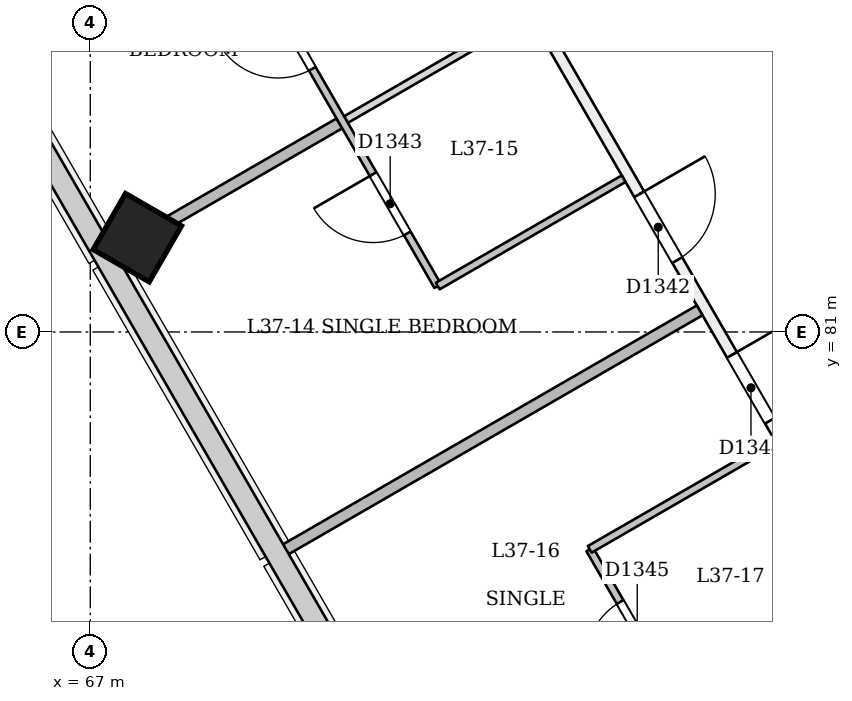
"""IFC4 building model, lengths in metres.
Left out: names, types, materials, properties, quantities, classifications, styles, units other than length and angle.
Written with IfcOpenShell. Run it as: python <this file> out.ifc"""

import sys

from ifc_helpers import new_model, si_unit, direction, frame, frame_2d, origin, origin_2d, place, context, subcontext, project, spatial, rectangle, extrude, element, fill, save


model = new_model("IFC4")
c1 = context("Model", 3, precision=1e-05, world=origin(), true_north=direction((0.0, 1.0)))
c2 = subcontext(c1, "Body", "Model", "MODEL_VIEW")
j1 = project(units=[si_unit("LENGTHUNIT", "METRE"), si_unit("PLANEANGLEUNIT", "RADIAN")], contexts=[c1])
p1 = place(None, origin())
s1 = spatial("IfcSite", under=j1, at=p1, CompositionType="ELEMENT")
p2 = place(p1, origin())
s2 = spatial("IfcBuilding", under=s1, at=p2, CompositionType="ELEMENT")
p3 = place(p2, frame((0.0, 0.0, 145.8)))
s3 = spatial("IfcBuildingStorey", under=s2, at=p3, CompositionType="ELEMENT", Elevation=145.8)
p4 = place(p3, frame((67.592, 82.193, -0.026), z_axis=(0.02222134892, 0.038480872521, 0.999012229206), x_axis=(-0.86564209005, -0.49918218391, 0.038482713007)))
e1 = element("IfcColumn", 1, at=p4, inside=s3, PredefinedType="COLUMN", context=c2, shape_type="SweptSolid", body=[
    extrude(rectangle(XDim=0.85, YDim=0.85, at=origin_2d()), origin(), (0.0, 0.0, 1.0), 3.604),
])
p5 = place(p3, frame((84.935, 70.457, 0.0), z_axis=(0.0, 0.0, 1.0), x_axis=(-0.50000209693, 0.866024193118, 0.0)))
e2 = element("IfcWall", 2, at=p5, inside=s3, PredefinedType="PARTITIONING", context=c2, shape_type="SweptSolid", body=[
    extrude(rectangle(XDim=22.798, YDim=0.15, at=frame_2d((11.399, 0.0))), origin(), (0.0, 0.0, 1.0), 3.15),
])
p6 = place(p5, frame((19.283, 0.0, 0.0)))
e3 = element("IfcOpeningElement", 3, at=p6, cuts=e2, PredefinedType="OPENING", context=c2, shape_type="SweptSolid", body=[
    extrude(rectangle(XDim=1.0, YDim=2.1, at=frame_2d((0.5, 1.05))), frame((0.0, 0.085, 0.0), z_axis=(0.0, -1.0, 0.0), x_axis=(1.0, 0.0, 0.0)), (0.0, 0.0, 1.0), 0.171),
])
p7 = place(p5, frame((13.973, 0.0, 0.0)))
e4 = element("IfcOpeningElement", 4, at=p7, cuts=e2, PredefinedType="OPENING", context=c2, shape_type="SweptSolid", body=[
    extrude(rectangle(XDim=1.0, YDim=2.1, at=frame_2d((0.5, 1.05))), frame((0.0, 0.085, 0.0), z_axis=(0.0, -1.0, 0.0), x_axis=(1.0, 0.0, 0.0)), (0.0, 0.0, 1.0), 0.171),
])
p8 = place(p5, frame((5.691, 0.0, 0.0)))
e5 = element("IfcOpeningElement", 5, at=p8, cuts=e2, PredefinedType="OPENING", context=c2, shape_type="SweptSolid", body=[
    extrude(rectangle(XDim=1.0, YDim=2.1, at=frame_2d((0.5, 1.05))), frame((0.0, 0.085, 0.0), z_axis=(0.0, -1.0, 0.0), x_axis=(1.0, 0.0, 0.0)), (0.0, 0.0, 1.0), 0.171),
])
p9 = place(p5, frame((9.424, 0.0, 0.0)))
e6 = element("IfcOpeningElement", 6, at=p9, cuts=e2, PredefinedType="OPENING", context=c2, shape_type="SweptSolid", body=[
    extrude(rectangle(XDim=1.0, YDim=2.1, at=frame_2d((0.5, 1.05))), frame((0.0, 0.085, 0.0), z_axis=(0.0, -1.0, 0.0), x_axis=(1.0, 0.0, 0.0)), (0.0, 0.0, 1.0), 0.171),
])
p10 = place(p3, frame((66.082, 96.91, 0.0), z_axis=(0.0, 0.0, 1.0), x_axis=(0.500001949747, -0.866024278094, 0.0)))
e7 = element("IfcWall", 7, at=p10, inside=s3, PredefinedType="PARTITIONING", context=c2, shape_type="SweptSolid", body=[
    extrude(rectangle(XDim=37.705, YDim=0.15, at=frame_2d((18.853, 0.0))), origin(), (0.0, 0.0, 1.0), 2.75),
])
p11 = place(p10, frame((1.75, 0.0, 0.0)))
e8 = element("IfcOpeningElement", 8, at=p11, cuts=e7, PredefinedType="OPENING", context=c2, shape_type="SweptSolid", body=[
    extrude(rectangle(XDim=1.0, YDim=2.1, at=frame_2d((0.5, 1.05))), frame((0.0, 0.085, 0.0), z_axis=(0.0, -1.0, 0.0), x_axis=(1.0, 0.0, 0.0)), (0.0, 0.0, 1.0), 0.171),
])
p12 = place(p10, frame((7.329, 0.0, 0.0)))
e9 = element("IfcOpeningElement", 9, at=p12, cuts=e7, PredefinedType="OPENING", context=c2, shape_type="SweptSolid", body=[
    extrude(rectangle(XDim=1.1, YDim=2.1, at=frame_2d((0.55, 1.05))), frame((0.0, 0.085, 0.0), z_axis=(0.0, -1.0, 0.0), x_axis=(1.0, 0.0, 0.0)), (0.0, 0.0, 1.0), 0.171),
])
p13 = place(p10, frame((9.72, 0.0, 0.0)))
e10 = element("IfcOpeningElement", 10, at=p13, cuts=e7, PredefinedType="OPENING", context=c2, shape_type="SweptSolid", body=[
    extrude(rectangle(XDim=1.0, YDim=2.1, at=frame_2d((0.5, 1.05))), frame((0.0, 0.085, 0.0), z_axis=(0.0, -1.0, 0.0), x_axis=(1.0, 0.0, 0.0)), (0.0, 0.0, 1.0), 0.171),
])
p14 = place(p10, frame((16.28, 0.0, 0.0)))
e11 = element("IfcOpeningElement", 11, at=p14, cuts=e7, PredefinedType="OPENING", context=c2, shape_type="SweptSolid", body=[
    extrude(rectangle(XDim=1.0, YDim=2.1, at=frame_2d((0.5, 1.05))), frame((0.0, 0.085, 0.0), z_axis=(0.0, -1.0, 0.0), x_axis=(1.0, 0.0, 0.0)), (0.0, 0.0, 1.0), 0.171),
])
p15 = place(p10, frame((18.72, 0.0, 0.0)))
e12 = element("IfcOpeningElement", 12, at=p15, cuts=e7, PredefinedType="OPENING", context=c2, shape_type="SweptSolid", body=[
    extrude(rectangle(XDim=1.0, YDim=2.1, at=frame_2d((0.5, 1.05))), frame((0.0, 0.085, 0.0), z_axis=(0.0, -1.0, 0.0), x_axis=(1.0, 0.0, 0.0)), (0.0, 0.0, 1.0), 0.171),
])
p16 = place(p10, frame((25.28, 0.0, 0.0)))
e13 = element("IfcOpeningElement", 13, at=p16, cuts=e7, PredefinedType="OPENING", context=c2, shape_type="SweptSolid", body=[
    extrude(rectangle(XDim=1.0, YDim=2.1, at=frame_2d((0.5, 1.05))), frame((0.0, 0.085, 0.0), z_axis=(0.0, -1.0, 0.0), x_axis=(1.0, 0.0, 0.0)), (0.0, 0.0, 1.0), 0.171),
])
p17 = place(p10, frame((27.72, 0.0, 0.0)))
e14 = element("IfcOpeningElement", 14, at=p17, cuts=e7, PredefinedType="OPENING", context=c2, shape_type="SweptSolid", body=[
    extrude(rectangle(XDim=1.0, YDim=2.1, at=frame_2d((0.5, 1.05))), frame((0.0, 0.085, 0.0), z_axis=(0.0, -1.0, 0.0), x_axis=(1.0, 0.0, 0.0)), (0.0, 0.0, 1.0), 0.171),
])
p18 = place(p10, frame((34.329, 0.0, 0.0)))
e15 = element("IfcOpeningElement", 15, at=p18, cuts=e7, PredefinedType="OPENING", context=c2, shape_type="SweptSolid", body=[
    extrude(rectangle(XDim=1.1, YDim=2.1, at=frame_2d((0.55, 1.05))), frame((0.0, 0.085, 0.0), z_axis=(0.0, -1.0, 0.0), x_axis=(1.0, 0.0, 0.0)), (0.0, 0.0, 1.0), 0.171),
])
p19 = place(p3, frame((71.571, 81.604, 0.0), z_axis=(0.0, 0.0, 1.0), x_axis=(-0.500004234368, 0.866022959057, 0.0)))
e16 = element("IfcWall", 16, at=p19, inside=s3, PredefinedType="PARTITIONING", context=c2, shape_type="SweptSolid", body=[
    extrude(rectangle(XDim=5.0, YDim=0.1, at=frame_2d((2.5, 0.0))), origin(), (0.0, 0.0, 1.0), 2.75),
])
p20 = place(p19, frame((3.3, 0.0, 0.0)))
e17 = element("IfcOpeningElement", 17, at=p20, cuts=e16, PredefinedType="OPENING", context=c2, shape_type="SweptSolid", body=[
    extrude(rectangle(XDim=0.9, YDim=2.1, at=frame_2d((0.45, 1.05))), frame((0.0, 0.061, 0.0), z_axis=(0.0, -1.0, 0.0), x_axis=(1.0, 0.0, 0.0)), (0.0, 0.0, 1.0), 0.121),
])
p21 = place(p19, frame((0.8, 0.0, 0.0)))
e18 = element("IfcOpeningElement", 18, at=p21, cuts=e16, PredefinedType="OPENING", context=c2, shape_type="SweptSolid", body=[
    extrude(rectangle(XDim=0.9, YDim=2.1, at=frame_2d((0.45, 1.05))), frame((0.0, 0.061, 0.0), z_axis=(0.0, -1.0, 0.0), x_axis=(1.0, 0.0, 0.0)), (0.0, 0.0, 1.0), 0.121),
])
p22 = place(p3, frame((67.29, 82.019, 0.0), z_axis=(0.0, 0.0, 1.0), x_axis=(0.866013532718, 0.500020560727, 0.0)))
e19 = element("IfcWall", 19, at=p22, inside=s3, PredefinedType="PARTITIONING", context=c2, shape_type="SweptSolid", body=[
    extrude(rectangle(XDim=3.45, YDim=0.15, at=frame_2d((1.725, 0.0))), origin(), (0.0, 0.0, 1.0), 2.65),
])
p23 = place(p3, frame((70.364, 83.794, 0.0), z_axis=(0.0, 0.0, 1.0), x_axis=(0.866042014628, 0.499971228071, 0.0)))
e20 = element("IfcWall", 20, at=p23, inside=s3, PredefinedType="PARTITIONING", context=c2, shape_type="SweptSolid", body=[
    extrude(rectangle(XDim=2.775, YDim=0.1, at=frame_2d((1.388, 0.0))), origin(), (0.0, 0.0, 1.0), 2.75),
])
p24 = place(p3, frame((74.017, 83.017, 0.0), z_axis=(0.0, 0.0, 1.0), x_axis=(-0.866011447264, -0.500024172624, 0.0)))
e21 = element("IfcWall", 21, at=p24, inside=s3, PredefinedType="PARTITIONING", context=c2, shape_type="SweptSolid", body=[
    extrude(rectangle(XDim=2.825, YDim=0.1, at=frame_2d((1.413, 0.0))), origin(), (0.0, 0.0, 1.0), 3.15),
])
p25 = place(p3, frame((69.522, 78.112, 0.0), z_axis=(0.0, 0.0, 1.0), x_axis=(0.866025401434, 0.500000004071, 0.0)))
e22 = element("IfcWall", 22, at=p25, inside=s3, PredefinedType="PARTITIONING", context=c2, shape_type="SweptSolid", body=[
    extrude(rectangle(XDim=6.345, YDim=0.15, at=frame_2d((3.173, 0.0))), origin(), (0.0, 0.0, 1.0), 2.65),
])
p26 = place(p3, frame((76.071, 73.81, 0.0), z_axis=(0.0, 0.0, 1.0), x_axis=(-0.500004234368, 0.866022959057, 0.0)))
e23 = element("IfcWall", 23, at=p26, inside=s3, PredefinedType="PARTITIONING", context=c2, shape_type="SweptSolid", body=[
    extrude(rectangle(XDim=5.0, YDim=0.1, at=frame_2d((2.5, 0.0))), origin(), (0.0, 0.0, 1.0), 2.75),
])
p27 = place(p26, frame((3.3, 0.0, 0.0)))
e24 = element("IfcOpeningElement", 24, at=p27, cuts=e23, PredefinedType="OPENING", context=c2, shape_type="SweptSolid", body=[
    extrude(rectangle(XDim=0.9, YDim=2.1, at=frame_2d((0.45, 1.05))), frame((0.0, 0.061, 0.0), z_axis=(0.0, -1.0, 0.0), x_axis=(1.0, 0.0, 0.0)), (0.0, 0.0, 1.0), 0.121),
])
p28 = place(p26, frame((0.8, 0.0, 0.0)))
e25 = element("IfcOpeningElement", 25, at=p28, cuts=e23, PredefinedType="OPENING", context=c2, shape_type="SweptSolid", body=[
    extrude(rectangle(XDim=0.9, YDim=2.1, at=frame_2d((0.45, 1.05))), frame((0.0, 0.061, 0.0), z_axis=(0.0, -1.0, 0.0), x_axis=(1.0, 0.0, 0.0)), (0.0, 0.0, 1.0), 0.121),
])
p29 = place(p3, frame((73.571, 78.14, 0.0), z_axis=(0.0, 0.0, 1.0), x_axis=(0.866011447264, 0.500024172624, 0.0)))
e26 = element("IfcWall", 26, at=p29, inside=s3, PredefinedType="PARTITIONING", context=c2, shape_type="SweptSolid", body=[
    extrude(rectangle(XDim=2.825, YDim=0.1, at=frame_2d((1.413, 0.0))), origin(), (0.0, 0.0, 1.0), 3.15),
])
p30 = place(p3, frame((74.864, 76.0, 0.0), z_axis=(0.0, 0.0, 1.0), x_axis=(0.866042014628, 0.499971228071, 0.0)))
e27 = element("IfcWall", 27, at=p30, inside=s3, PredefinedType="PARTITIONING", context=c2, shape_type="SweptSolid", body=[
    extrude(rectangle(XDim=2.775, YDim=0.1, at=frame_2d((1.388, 0.0))), origin(), (0.0, 0.0, 1.0), 2.75),
])
p31 = place(p20, origin())
e28 = element("IfcDoor", 28, at=p31, inside=s3, OperationType="SINGLE_SWING_RIGHT", PredefinedType="NOTDEFINED", context=c2, shape_type="SweptSolid", body=[
    extrude(rectangle(XDim=0.9, YDim=2.1, at=frame_2d((0.45, 1.05))), frame((0.0, 0.025, 0.0), z_axis=(0.0, -1.0, 0.0), x_axis=(1.0, 0.0, 0.0)), (0.0, 0.0, 1.0), 0.05),
])
fill(e17, e28)
p32 = place(p14, origin())
e29 = element("IfcDoor", 29, at=p32, inside=s3, OperationType="SINGLE_SWING_LEFT", PredefinedType="NOTDEFINED", context=c2, shape_type="SweptSolid", body=[
    extrude(rectangle(XDim=1.0, YDim=2.1, at=frame_2d((0.5, 1.05))), frame((0.0, 0.025, 0.0), z_axis=(0.0, -1.0, 0.0), x_axis=(1.0, 0.0, 0.0)), (0.0, 0.0, 1.0), 0.05),
])
fill(e11, e29)
p33 = place(p21, origin())
e30 = element("IfcDoor", 30, at=p33, inside=s3, OperationType="SINGLE_SWING_RIGHT", PredefinedType="NOTDEFINED", context=c2, shape_type="SweptSolid", body=[
    extrude(rectangle(XDim=0.9, YDim=2.1, at=frame_2d((0.45, 1.05))), frame((0.0, 0.025, 0.0), z_axis=(0.0, -1.0, 0.0), x_axis=(1.0, 0.0, 0.0)), (0.0, 0.0, 1.0), 0.05),
])
fill(e18, e30)
p34 = place(p15, origin())
e31 = element("IfcDoor", 31, at=p34, inside=s3, OperationType="SINGLE_SWING_LEFT", PredefinedType="NOTDEFINED", context=c2, shape_type="SweptSolid", body=[
    extrude(rectangle(XDim=1.0, YDim=2.1, at=frame_2d((0.5, 1.05))), frame((0.0, 0.025, 0.0), z_axis=(0.0, -1.0, 0.0), x_axis=(1.0, 0.0, 0.0)), (0.0, 0.0, 1.0), 0.05),
])
fill(e12, e31)
p35 = place(p27, origin())
e32 = element("IfcDoor", 32, at=p35, inside=s3, OperationType="SINGLE_SWING_LEFT", PredefinedType="NOTDEFINED", context=c2, shape_type="SweptSolid", body=[
    extrude(rectangle(XDim=0.9, YDim=2.1, at=frame_2d((0.45, 1.05))), frame((0.0, 0.025, 0.0), z_axis=(0.0, -1.0, 0.0), x_axis=(1.0, 0.0, 0.0)), (0.0, 0.0, 1.0), 0.05),
])
fill(e24, e32)
save(model, sys.argv[1])
